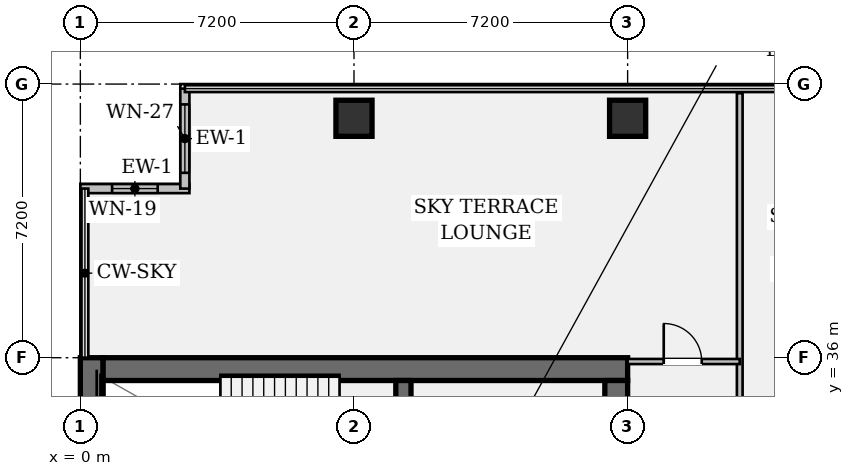
"""IFC4 building model, lengths in metres.
Left out: names, types, materials, properties, quantities, classifications, styles, units other than length and angle.
Written with IfcOpenShell. Run it as: python <this file> out.ifc"""

import sys

from ifc_helpers import new_model, si_unit, direction, frame, frame_2d, origin, origin_2d, place, context, subcontext, project, spatial, rectangle, hollow_rectangle, extrude, element, fill, save


model = new_model("IFC4")
c1 = context("Model", 3, precision=1e-05, world=origin(), true_north=direction((0.0, 1.0)))
c2 = subcontext(c1, "Body", "Model", "MODEL_VIEW")
j1 = project(units=[si_unit("LENGTHUNIT", "METRE"), si_unit("PLANEANGLEUNIT", "RADIAN")], contexts=[c1])
p1 = place(None, origin())
s1 = spatial("IfcSite", under=j1, at=p1, CompositionType="ELEMENT")
p2 = place(p1, origin())
s2 = spatial("IfcBuilding", under=s1, at=p2, CompositionType="ELEMENT")
p3 = place(p2, frame((0.0, 0.0, 97.65)))
s3 = spatial("IfcBuildingStorey", under=s2, at=p3, CompositionType="ELEMENT", Elevation=97.65)
p4 = place(p3, frame((0.3, 7.2, 0.0), z_axis=(0.0, 0.0, 1.0), x_axis=(0.0, 1.0, 0.0)))
e1 = element("IfcWall", 1, at=p4, inside=s3, PredefinedType="SHEAR", context=c2, shape_type="SweptSolid", body=[
    extrude(rectangle(XDim=28.8, YDim=0.6, at=frame_2d((14.4, 0.0))), origin(), (0.0, 0.0, 1.0), 4.28),
])
p5 = place(p3, frame((0.6, 35.7, 0.0), z_axis=(0.0, 0.0, 1.0), x_axis=(1.0, 0.0, 0.0)))
e2 = element("IfcWall", 2, at=p5, inside=s3, PredefinedType="SHEAR", context=c2, shape_type="SweptSolid", body=[
    extrude(rectangle(XDim=13.8, YDim=0.6, at=frame_2d((6.9, 0.0))), origin(), (0.0, 0.0, 1.0), 4.28),
])
p6 = place(p3, frame((14.1, 35.4, 0.0), z_axis=(0.0, 0.0, 1.0), x_axis=(0.0, -1.0, 0.0)))
e3 = element("IfcWall", 3, at=p6, inside=s3, PredefinedType="SHEAR", context=c2, shape_type="SweptSolid", body=[
    extrude(rectangle(XDim=27.6, YDim=0.6, at=frame_2d((13.8, 0.0))), origin(), (0.0, 0.0, 1.0), 4.28),
])
p7 = place(p6, frame((1.3, 0.0, 0.0)))
e4 = element("IfcOpeningElement", 4, at=p7, cuts=e3, PredefinedType="OPENING", context=c2, shape_type="SweptSolid", body=[
    extrude(rectangle(XDim=1.2, YDim=2.15, at=frame_2d((0.6, 1.075))), frame((0.0, 0.312, 0.0), z_axis=(0.0, -1.0, 0.0), x_axis=(1.0, 0.0, 0.0)), (0.0, 0.0, 1.0), 0.624),
])
p8 = place(p6, frame((25.25, 0.0, 0.0)))
e5 = element("IfcOpeningElement", 5, at=p8, cuts=e3, PredefinedType="OPENING", context=c2, shape_type="SweptSolid", body=[
    extrude(rectangle(XDim=1.2, YDim=2.15, at=frame_2d((0.6, 1.075))), frame((0.0, 0.312, 0.0), z_axis=(0.0, -1.0, 0.0), x_axis=(1.0, 0.0, 0.0)), (0.0, 0.0, 1.0), 0.624),
])
p9 = place(p6, frame((14.6, 0.0, 0.0)))
e6 = element("IfcOpeningElement", 6, at=p9, cuts=e3, PredefinedType="OPENING", context=c2, shape_type="SweptSolid", body=[
    extrude(rectangle(XDim=1.6, YDim=2.2, at=frame_2d((0.8, 1.1))), frame((0.0, 0.312, 0.0), z_axis=(0.0, -1.0, 0.0), x_axis=(1.0, 0.0, 0.0)), (0.0, 0.0, 1.0), 0.624),
])
p10 = place(p3, frame((8.5, 31.72, 0.0), z_axis=(0.0, 0.0, 1.0), x_axis=(0.0, 1.0, 0.0)))
e7 = element("IfcWall", 7, at=p10, inside=s3, PredefinedType="SHEAR", context=c2, shape_type="SweptSolid", body=[
    extrude(rectangle(XDim=3.68, YDim=0.4, at=frame_2d((1.84, 0.0))), origin(), (0.0, 0.0, 1.0), 4.28),
])
p11 = place(p10, frame((0.9, 0.0, 0.0)))
e8 = element("IfcOpeningElement", 8, at=p11, cuts=e7, PredefinedType="OPENING", context=c2, shape_type="SweptSolid", body=[
    extrude(rectangle(XDim=1.1, YDim=2.15, at=frame_2d((0.55, 1.075))), frame((0.0, 0.212, 0.0), z_axis=(0.0, -1.0, 0.0), x_axis=(1.0, 0.0, 0.0)), (0.0, 0.0, 1.0), 0.424),
])
for number, where, z_axis, x_axis in (
    (9, (7.2, 42.3, 0.0), (0.0, 0.0, 1.0), (1.0, 0.0, 0.0)),
    (10, (14.4, 42.3, 0.0), (0.0, 0.0, 1.0), (1.0, 0.0, 0.0)),
):
    element("IfcColumn", number, at=place(p3, frame(where, z_axis=z_axis, x_axis=x_axis)), inside=s3, PredefinedType="COLUMN", context=c2, shape_type="SweptSolid", body=[
        extrude(hollow_rectangle(XDim=0.95, YDim=0.95, WallThickness=0.06, at=origin_2d()), origin(), (0.0, 0.0, 1.0), 4.28),
    ])
p12 = place(p3, frame((0.0, 40.45, 0.0), z_axis=(0.0, 0.0, 1.0), x_axis=(1.0, 0.0, 0.0)))
e11 = element("IfcWall", 11, at=p12, inside=s3, PredefinedType="STANDARD", context=c2, shape_type="SweptSolid", body=[
    extrude(rectangle(XDim=2.87, YDim=0.24, at=frame_2d((1.435, 0.0))), origin(), (0.0, 0.0, 1.0), 4.28),
])
p13 = place(p12, frame((0.835, 0.0, 0.95)))
e12 = element("IfcOpeningElement", 12, at=p13, cuts=e11, PredefinedType="OPENING", context=c2, shape_type="SweptSolid", body=[
    extrude(rectangle(XDim=1.2, YDim=1.8, at=frame_2d((0.6, 0.9))), frame((0.0, 0.132, 0.0), z_axis=(0.0, -1.0, 0.0), x_axis=(1.0, 0.0, 0.0)), (0.0, 0.0, 1.0), 0.264),
])
p14 = place(p3, frame((2.75, 40.45, 0.0), z_axis=(0.0, 0.0, 1.0), x_axis=(0.0, 1.0, 0.0)))
e13 = element("IfcWall", 13, at=p14, inside=s3, PredefinedType="STANDARD", context=c2, shape_type="SweptSolid", body=[
    extrude(rectangle(XDim=2.63, YDim=0.24, at=frame_2d((1.315, 0.0))), origin(), (0.0, 0.0, 1.0), 4.28),
])
p15 = place(p14, frame((0.415, 0.0, 0.95)))
e14 = element("IfcOpeningElement", 14, at=p15, cuts=e13, PredefinedType="OPENING", context=c2, shape_type="SweptSolid", body=[
    extrude(rectangle(XDim=1.8, YDim=1.35, at=frame_2d((0.9, 0.675))), frame((0.0, 0.132, 0.0), z_axis=(0.0, -1.0, 0.0), x_axis=(1.0, 0.0, 0.0)), (0.0, 0.0, 1.0), 0.264),
])
p16 = place(p3, frame((17.35, 22.0, 0.0), z_axis=(0.0, 0.0, 1.0), x_axis=(0.0, 1.0, 0.0)))
e15 = element("IfcWall", 15, at=p16, inside=s3, PredefinedType="PARTITIONING", context=c2, shape_type="SweptSolid", body=[
    extrude(rectangle(XDim=20.96, YDim=0.15, at=frame_2d((10.48, 0.0))), origin(), (0.0, 0.0, 1.0), 3.493),
])
p17 = place(p16, frame((0.9, 0.0, 0.0)))
e16 = element("IfcOpeningElement", 16, at=p17, cuts=e15, PredefinedType="OPENING", context=c2, shape_type="SweptSolid", body=[
    extrude(rectangle(XDim=0.9, YDim=2.15, at=frame_2d((0.45, 1.075))), frame((0.0, 0.087, 0.0), z_axis=(0.0, -1.0, 0.0), x_axis=(1.0, 0.0, 0.0)), (0.0, 0.0, 1.0), 0.174),
])
p18 = place(p16, frame((4.0, 0.0, 0.0)))
e17 = element("IfcOpeningElement", 17, at=p18, cuts=e15, PredefinedType="OPENING", context=c2, shape_type="SweptSolid", body=[
    extrude(rectangle(XDim=0.98, YDim=2.15, at=frame_2d((0.49, 1.075))), frame((0.0, 0.087, 0.0), z_axis=(0.0, -1.0, 0.0), x_axis=(1.0, 0.0, 0.0)), (0.0, 0.0, 1.0), 0.174),
])
p19 = place(p16, frame((7.4, 0.0, 0.0)))
e18 = element("IfcOpeningElement", 18, at=p19, cuts=e15, PredefinedType="OPENING", context=c2, shape_type="SweptSolid", body=[
    extrude(rectangle(XDim=0.98, YDim=2.15, at=frame_2d((0.49, 1.075))), frame((0.0, 0.087, 0.0), z_axis=(0.0, -1.0, 0.0), x_axis=(1.0, 0.0, 0.0)), (0.0, 0.0, 1.0), 0.174),
])
p20 = place(p16, frame((10.8, 0.0, 0.0)))
e19 = element("IfcOpeningElement", 19, at=p20, cuts=e15, PredefinedType="OPENING", context=c2, shape_type="SweptSolid", body=[
    extrude(rectangle(XDim=0.98, YDim=2.15, at=frame_2d((0.49, 1.075))), frame((0.0, 0.087, 0.0), z_axis=(0.0, -1.0, 0.0), x_axis=(1.0, 0.0, 0.0)), (0.0, 0.0, 1.0), 0.174),
])
p21 = place(p3, frame((14.4, 35.9, 0.0), z_axis=(0.0, 0.0, 1.0), x_axis=(1.0, 0.0, 0.0)))
e20 = element("IfcWall", 20, at=p21, inside=s3, PredefinedType="PARTITIONING", context=c2, shape_type="SweptSolid", body=[
    extrude(rectangle(XDim=2.95, YDim=0.135, at=frame_2d((1.475, 0.0))), origin(), (0.0, 0.0, 1.0), 3.493),
])
p22 = place(p21, frame((0.95, 0.0, 0.0)))
e21 = element("IfcOpeningElement", 21, at=p22, cuts=e20, PredefinedType="OPENING", context=c2, shape_type="SweptSolid", body=[
    extrude(rectangle(XDim=1.0, YDim=2.15, at=frame_2d((0.5, 1.075))), frame((0.0, 0.08, 0.0), z_axis=(0.0, -1.0, 0.0), x_axis=(1.0, 0.0, 0.0)), (0.0, 0.0, 1.0), 0.159),
])
p23 = place(p13, origin())
e22 = element("IfcWindow", 22, at=p23, inside=s3, PartitioningType="SINGLE_PANEL", PredefinedType="WINDOW", context=c2, shape_type="SweptSolid", body=[
    extrude(rectangle(XDim=1.2, YDim=1.8, at=frame_2d((0.6, 0.9))), frame((0.0, 0.03, 0.0), z_axis=(0.0, -1.0, 0.0), x_axis=(1.0, 0.0, 0.0)), (0.0, 0.0, 1.0), 0.06),
])
fill(e12, e22)
p24 = place(p15, origin())
e23 = element("IfcWindow", 23, at=p24, inside=s3, PartitioningType="SINGLE_PANEL", PredefinedType="WINDOW", context=c2, shape_type="SweptSolid", body=[
    extrude(rectangle(XDim=1.8, YDim=1.35, at=frame_2d((0.9, 0.675))), frame((0.0, 0.03, 0.0), z_axis=(0.0, -1.0, 0.0), x_axis=(1.0, 0.0, 0.0)), (0.0, 0.0, 1.0), 0.06),
])
fill(e14, e23)
p25 = place(p22, origin())
e24 = element("IfcDoor", 24, at=p25, inside=s3, OperationType="SINGLE_SWING_LEFT", PredefinedType="DOOR", context=c2, shape_type="SweptSolid", body=[
    extrude(rectangle(XDim=1.0, YDim=2.15, at=frame_2d((0.5, 1.075))), frame((0.0, 0.025, 0.0), z_axis=(0.0, -1.0, 0.0), x_axis=(1.0, 0.0, 0.0)), (0.0, 0.0, 1.0), 0.05),
])
fill(e21, e24)
save(model, sys.argv[1])
